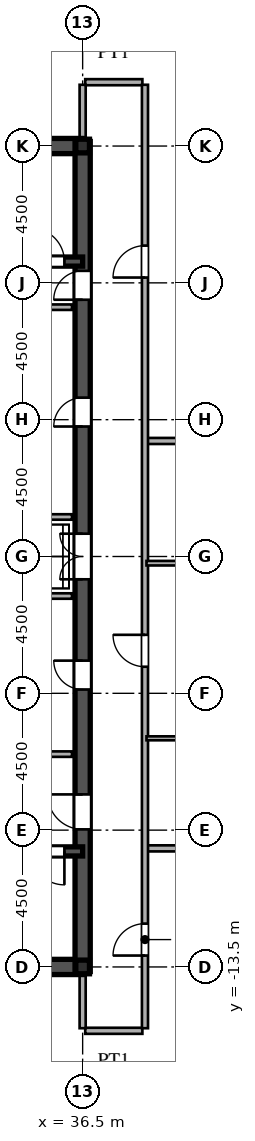
"""IFC4 building model, lengths in metres.
Left out: names, types, materials, properties, quantities, classifications, styles, units other than length and angle.
Written with IfcOpenShell. Run it as: python <this file> out.ifc"""

import sys

from ifc_helpers import new_model, si_unit, direction, frame, frame_2d, origin, origin_2d, place, context, subcontext, project, spatial, rectangle, i_section, extrude, source, transform, mapped, element, fill, save


model = new_model("IFC4")
c1 = context("Model", 3, precision=1e-05, world=origin(), true_north=direction((0.0, 1.0)))
c2 = subcontext(c1, "Body", "Model", "MODEL_VIEW")
j1 = project(units=[si_unit("LENGTHUNIT", "METRE"), si_unit("PLANEANGLEUNIT", "RADIAN")], contexts=[c1])
p1 = place(None, origin())
s1 = spatial("IfcSite", under=j1, at=p1, CompositionType="ELEMENT")
p2 = place(p1, origin())
s2 = spatial("IfcBuilding", under=s1, at=p2, CompositionType="ELEMENT")
p3 = place(p2, frame((0.0, 0.0, 261.9)))
s3 = spatial("IfcBuildingStorey", under=s2, at=p3, CompositionType="ELEMENT", Elevation=261.9)
m1 = source(origin(), c2, "Body", "SweptSolid", [
    extrude(i_section(OverallWidth=0.45, OverallDepth=0.45, WebThickness=0.016, FlangeThickness=0.025, at=origin_2d()), origin(), (0.0, 0.0, 1.0), 3.75),
])
for number, where, z_axis, x_axis in (
    (1, (36.5, -13.5, 0.0), (0.0, 0.0, 1.0), (1.0, 0.0, 0.0)),
    (2, (36.5, 13.5, 0.0), (0.0, 0.0, 1.0), (1.0, 0.0, 0.0)),
):
    element("IfcColumn", number, at=place(p3, frame(where, z_axis=z_axis, x_axis=x_axis)), inside=s3, PredefinedType="COLUMN", context=c2, shape_type="MappedRepresentation", body=[
        mapped(m1, transform((0.0, 0.0, 0.0), scale=1.0)),
    ])
for number, where, z_axis, x_axis in (
    (3, (27.5, -13.5, 0.0), (0.0, 0.0, 1.0), (1.0, 0.0, 0.0)),
    (4, (27.5, 13.5, 0.0), (0.0, 0.0, 1.0), (1.0, 0.0, 0.0)),
):
    element("IfcWall", number, at=place(p3, frame(where, z_axis=z_axis, x_axis=x_axis)), inside=s3, PredefinedType="SHEAR", context=c2, shape_type="SweptSolid", body=[
        extrude(rectangle(XDim=9.0, YDim=0.5, at=frame_2d((4.5, 0.0))), origin(), (0.0, 0.0, 1.0), 3.53),
    ])
p4 = place(p3, frame((36.5, -13.65, 0.0), z_axis=(0.0, 0.0, 1.0), x_axis=(0.0, 1.0, 0.0)))
e5 = element("IfcWall", 5, at=p4, inside=s3, PredefinedType="SHEAR", context=c2, shape_type="SweptSolid", body=[
    extrude(rectangle(XDim=7.15, YDim=0.5, at=frame_2d((3.575, 0.0))), origin(), (0.0, 0.0, 1.0), 3.53),
])
p5 = place(p4, frame((4.675, 0.0, 0.0)))
e6 = element("IfcOpeningElement", 6, at=p5, cuts=e5, PredefinedType="OPENING", context=c2, shape_type="SweptSolid", body=[
    extrude(rectangle(XDim=1.15, YDim=2.2, at=frame_2d((0.575, 1.1))), frame((0.0, 0.26, 0.0), z_axis=(0.0, -1.0, 0.0), x_axis=(1.0, 0.0, 0.0)), (0.0, 0.0, 1.0), 0.52),
])
p6 = place(p3, frame((36.5, -1.3, 0.0), z_axis=(0.0, 0.0, 1.0), x_axis=(0.0, 1.0, 0.0)))
e7 = element("IfcWall", 7, at=p6, inside=s3, PredefinedType="SHEAR", context=c2, shape_type="SweptSolid", body=[
    extrude(rectangle(XDim=2.6, YDim=0.5, at=frame_2d((1.3, 0.0))), origin(), (0.0, 0.0, 1.0), 3.53),
])
p7 = place(p6, frame((0.55, 0.0, 0.0)))
e8 = element("IfcOpeningElement", 8, at=p7, cuts=e7, PredefinedType="OPENING", context=c2, shape_type="SweptSolid", body=[
    extrude(rectangle(XDim=1.5, YDim=2.3, at=frame_2d((0.75, 1.15))), frame((0.0, 0.26, 0.0), z_axis=(0.0, -1.0, 0.0), x_axis=(1.0, 0.0, 0.0)), (0.0, 0.0, 1.0), 0.52),
])
p8 = place(p3, frame((36.5, 8.2, 0.0), z_axis=(0.0, 0.0, 1.0), x_axis=(0.0, 1.0, 0.0)))
e9 = element("IfcWall", 9, at=p8, inside=s3, PredefinedType="SHEAR", context=c2, shape_type="SweptSolid", body=[
    extrude(rectangle(XDim=5.45, YDim=0.5, at=frame_2d((2.725, 0.0))), origin(), (0.0, 0.0, 1.0), 3.53),
])
p9 = place(p8, frame((0.245, 0.0, 0.0)))
e10 = element("IfcOpeningElement", 10, at=p9, cuts=e9, PredefinedType="OPENING", context=c2, shape_type="SweptSolid", body=[
    extrude(rectangle(XDim=0.95, YDim=2.15, at=frame_2d((0.475, 1.075))), frame((0.0, 0.26, 0.0), z_axis=(0.0, -1.0, 0.0), x_axis=(1.0, 0.0, 0.0)), (0.0, 0.0, 1.0), 0.52),
])
p10 = place(p3, frame((36.5, -6.5, 0.0), z_axis=(0.0, 0.0, 1.0), x_axis=(0.0, 1.0, 0.0)))
e11 = element("IfcWall", 11, at=p10, inside=s3, PredefinedType="SHEAR", context=c2, shape_type="SweptSolid", body=[
    extrude(rectangle(XDim=5.2, YDim=0.5, at=frame_2d((2.6, 0.0))), origin(), (0.0, 0.0, 1.0), 3.53),
])
p11 = place(p10, frame((2.125, 0.0, 0.0)))
e12 = element("IfcOpeningElement", 12, at=p11, cuts=e11, PredefinedType="OPENING", context=c2, shape_type="SweptSolid", body=[
    extrude(rectangle(XDim=0.95, YDim=2.15, at=frame_2d((0.475, 1.075))), frame((0.0, 0.26, 0.0), z_axis=(0.0, -1.0, 0.0), x_axis=(1.0, 0.0, 0.0)), (0.0, 0.0, 1.0), 0.52),
])
p12 = place(p3, frame((36.5, 1.3, 0.0), z_axis=(0.0, 0.0, 1.0), x_axis=(0.0, 1.0, 0.0)))
e13 = element("IfcWall", 13, at=p12, inside=s3, PredefinedType="SHEAR", context=c2, shape_type="SweptSolid", body=[
    extrude(rectangle(XDim=6.9, YDim=0.5, at=frame_2d((3.45, 0.0))), origin(), (0.0, 0.0, 1.0), 3.53),
])
p13 = place(p12, frame((2.975, 0.0, 0.0)))
e14 = element("IfcOpeningElement", 14, at=p13, cuts=e13, PredefinedType="OPENING", context=c2, shape_type="SweptSolid", body=[
    extrude(rectangle(XDim=0.95, YDim=2.15, at=frame_2d((0.475, 1.075))), frame((0.0, 0.26, 0.0), z_axis=(0.0, -1.0, 0.0), x_axis=(1.0, 0.0, 0.0)), (0.0, 0.0, 1.0), 0.52),
])
p14 = place(p3, frame((27.5, -9.7, 0.0), z_axis=(0.0, 0.0, 1.0), x_axis=(1.0, 0.0, 0.0)))
e15 = element("IfcWall", 15, at=p14, inside=s3, PredefinedType="SHEAR", context=c2, shape_type="SweptSolid", body=[
    extrude(rectangle(XDim=9.0, YDim=0.3, at=frame_2d((4.5, 0.0))), origin(), (0.0, 0.0, 1.0), 3.53),
])
p15 = place(p14, frame((7.3, 0.0, 0.0)))
e16 = element("IfcOpeningElement", 16, at=p15, cuts=e15, PredefinedType="OPENING", context=c2, shape_type="SweptSolid", body=[
    extrude(rectangle(XDim=1.1, YDim=2.2, at=frame_2d((0.55, 1.1))), frame((0.0, 0.16, 0.0), z_axis=(0.0, -1.0, 0.0), x_axis=(1.0, 0.0, 0.0)), (0.0, 0.0, 1.0), 0.32),
])
p16 = place(p3, frame((27.5, 9.7, 0.0), z_axis=(0.0, 0.0, 1.0), x_axis=(1.0, 0.0, 0.0)))
e17 = element("IfcWall", 17, at=p16, inside=s3, PredefinedType="SHEAR", context=c2, shape_type="SweptSolid", body=[
    extrude(rectangle(XDim=9.0, YDim=0.3, at=frame_2d((4.5, 0.0))), origin(), (0.0, 0.0, 1.0), 3.53),
])
p17 = place(p16, frame((7.3, 0.0, 0.0)))
e18 = element("IfcOpeningElement", 18, at=p17, cuts=e17, PredefinedType="OPENING", context=c2, shape_type="SweptSolid", body=[
    extrude(rectangle(XDim=1.1, YDim=2.2, at=frame_2d((0.55, 1.1))), frame((0.0, 0.16, 0.0), z_axis=(0.0, -1.0, 0.0), x_axis=(1.0, 0.0, 0.0)), (0.0, 0.0, 1.0), 0.32),
])
for number, where, z_axis, x_axis in (
    (19, (30.45, -6.5, 0.0), (0.0, 0.0, 1.0), (1.0, 0.0, 0.0)),
    (20, (30.45, 8.2, 0.0), (0.0, 0.0, 1.0), (1.0, 0.0, 0.0)),
):
    element("IfcWall", number, at=place(p3, frame(where, z_axis=z_axis, x_axis=x_axis)), inside=s3, PredefinedType="PARTITIONING", context=c2, shape_type="SweptSolid", body=[
        extrude(rectangle(XDim=5.7, YDim=0.18, at=frame_2d((2.85, 0.0))), origin(), (0.0, 0.0, 1.0), 3.53),
    ])
for number, where, z_axis, x_axis in (
    (21, (33.2, -1.3, 0.0), (0.0, 0.0, 1.0), (1.0, 0.0, 0.0)),
    (22, (33.2, 1.3, 0.0), (0.0, 0.0, 1.0), (1.0, 0.0, 0.0)),
):
    element("IfcWall", number, at=place(p3, frame(where, z_axis=z_axis, x_axis=x_axis)), inside=s3, PredefinedType="PARTITIONING", context=c2, shape_type="SweptSolid", body=[
        extrude(rectangle(XDim=2.95, YDim=0.18, at=frame_2d((1.475, 0.0))), origin(), (0.0, 0.0, 1.0), 3.53),
    ])
p18 = place(p3, frame((36.585, -15.6, 0.0), z_axis=(0.0, 0.0, 1.0), x_axis=(1.0, 0.0, 0.0)))
e23 = element("IfcWall", 23, at=p18, inside=s3, PredefinedType="PARTITIONING", context=c2, shape_type="SweptSolid", body=[
    extrude(rectangle(XDim=1.88, YDim=0.2, at=frame_2d((0.94, 0.0))), origin(), (0.0, 0.0, 1.0), 3.53),
])
p19 = place(p3, frame((38.63, -9.6, 0.0), z_axis=(0.0, 0.0, 1.0), x_axis=(1.0, 0.0, 0.0)))
e24 = element("IfcWall", 24, at=p19, inside=s3, PredefinedType="PARTITIONING", context=c2, shape_type="SweptSolid", body=[
    extrude(rectangle(XDim=15.38, YDim=0.2, at=frame_2d((7.69, 0.0))), origin(), (0.0, 0.0, 1.0), 3.53),
])
p20 = place(p3, frame((38.6, -5.98, 0.0), z_axis=(0.0, 0.0, 1.0), x_axis=(1.0, 0.0, 0.0)))
e25 = element("IfcWall", 25, at=p20, inside=s3, PredefinedType="PARTITIONING", context=c2, shape_type="SweptSolid", body=[
    extrude(rectangle(XDim=4.8, YDim=0.13, at=frame_2d((2.4, 0.0))), origin(), (0.0, 0.0, 1.0), 3.53),
])
p21 = place(p20, frame((1.96, 0.0, 0.0)))
e26 = element("IfcOpeningElement", 26, at=p21, cuts=e25, PredefinedType="OPENING", context=c2, shape_type="SweptSolid", body=[
    extrude(rectangle(XDim=0.88, YDim=2.1, at=frame_2d((0.44, 1.05))), frame((0.0, 0.075, 0.0), z_axis=(0.0, -1.0, 0.0), x_axis=(1.0, 0.0, 0.0)), (0.0, 0.0, 1.0), 0.15),
])
p22 = place(p3, frame((38.6, -0.22, 0.0), z_axis=(0.0, 0.0, 1.0), x_axis=(1.0, 0.0, 0.0)))
e27 = element("IfcWall", 27, at=p22, inside=s3, PredefinedType="PARTITIONING", context=c2, shape_type="SweptSolid", body=[
    extrude(rectangle(XDim=4.8, YDim=0.15, at=frame_2d((2.4, 0.0))), origin(), (0.0, 0.0, 1.0), 3.53),
])
p23 = place(p22, frame((1.925, 0.0, 0.0)))
e28 = element("IfcOpeningElement", 28, at=p23, cuts=e27, PredefinedType="OPENING", context=c2, shape_type="SweptSolid", body=[
    extrude(rectangle(XDim=0.95, YDim=2.15, at=frame_2d((0.475, 1.075))), frame((0.0, 0.085, 0.0), z_axis=(0.0, -1.0, 0.0), x_axis=(1.0, 0.0, 0.0)), (0.0, 0.0, 1.0), 0.17),
])
p24 = place(p3, frame((38.63, 3.8, 0.0), z_axis=(0.0, 0.0, 1.0), x_axis=(1.0, 0.0, 0.0)))
e29 = element("IfcWall", 29, at=p24, inside=s3, PredefinedType="PARTITIONING", context=c2, shape_type="SweptSolid", body=[
    extrude(rectangle(XDim=25.046, YDim=0.2, at=frame_2d((12.523, 0.0))), origin(), (0.0, 0.0, 1.0), 3.53),
])
p25 = place(p3, frame((36.585, 15.6, 0.0), z_axis=(0.0, 0.0, 1.0), x_axis=(1.0, 0.0, 0.0)))
e30 = element("IfcWall", 30, at=p25, inside=s3, PredefinedType="PARTITIONING", context=c2, shape_type="SweptSolid", body=[
    extrude(rectangle(XDim=1.88, YDim=0.2, at=frame_2d((0.94, 0.0))), origin(), (0.0, 0.0, 1.0), 3.53),
])
for number, where, z_axis, x_axis in (
    (31, (36.5, -15.515, 0.0), (0.0, 0.0, 1.0), (0.0, 1.0, 0.0)),
    (32, (36.5, 13.755, 0.0), (0.0, 0.0, 1.0), (0.0, 1.0, 0.0)),
):
    element("IfcWall", number, at=place(p3, frame(where, z_axis=z_axis, x_axis=x_axis)), inside=s3, PredefinedType="PARTITIONING", context=c2, shape_type="SweptSolid", body=[
        extrude(rectangle(XDim=1.76, YDim=0.2, at=frame_2d((0.88, 0.0))), origin(), (0.0, 0.0, 1.0), 2.93),
    ])
p26 = place(p3, frame((38.55, -15.515, 0.0), z_axis=(0.0, 0.0, 1.0), x_axis=(0.0, 1.0, 0.0)))
e33 = element("IfcWall", 33, at=p26, inside=s3, PredefinedType="PARTITIONING", context=c2, shape_type="SweptSolid", body=[
    extrude(rectangle(XDim=31.03, YDim=0.2, at=frame_2d((15.515, 0.0))), origin(), (0.0, 0.0, 1.0), 3.53),
])
p27 = place(p26, frame((2.39, 0.0, 0.0)))
e34 = element("IfcOpeningElement", 34, at=p27, cuts=e33, PredefinedType="OPENING", context=c2, shape_type="SweptSolid", body=[
    extrude(rectangle(XDim=1.05, YDim=2.25, at=frame_2d((0.525, 1.125))), frame((0.0, 0.11, 0.0), z_axis=(0.0, -1.0, 0.0), x_axis=(1.0, 0.0, 0.0)), (0.0, 0.0, 1.0), 0.22),
])
p28 = place(p26, frame((11.889, 0.0, 0.0)))
e35 = element("IfcOpeningElement", 35, at=p28, cuts=e33, PredefinedType="OPENING", context=c2, shape_type="SweptSolid", body=[
    extrude(rectangle(XDim=1.05, YDim=2.25, at=frame_2d((0.525, 1.125))), frame((0.0, 0.11, 0.0), z_axis=(0.0, -1.0, 0.0), x_axis=(1.0, 0.0, 0.0)), (0.0, 0.0, 1.0), 0.22),
])
p29 = place(p26, frame((24.69, 0.0, 0.0)))
e36 = element("IfcOpeningElement", 36, at=p29, cuts=e33, PredefinedType="OPENING", context=c2, shape_type="SweptSolid", body=[
    extrude(rectangle(XDim=1.05, YDim=2.25, at=frame_2d((0.525, 1.125))), frame((0.0, 0.11, 0.0), z_axis=(0.0, -1.0, 0.0), x_axis=(1.0, 0.0, 0.0)), (0.0, 0.0, 1.0), 0.22),
])
m2 = source(origin(), c2, "Body", "SweptSolid", [
    extrude(rectangle(XDim=1.15, YDim=2.2, at=frame_2d((0.575, 1.1))), frame((0.0, 0.025, 0.0), z_axis=(0.0, -1.0, 0.0), x_axis=(1.0, 0.0, 0.0)), (0.0, 0.0, 1.0), 0.05),
])
p30 = place(p5, origin())
e37 = element("IfcDoor", 37, at=p30, inside=s3, OperationType="SINGLE_SWING_RIGHT", PredefinedType="DOOR", context=c2, shape_type="MappedRepresentation", body=[
    mapped(m2, transform((0.0, 0.0, 0.0), scale=1.0)),
])
fill(e6, e37)
m3 = source(origin(), c2, "Body", "SweptSolid", [
    extrude(rectangle(XDim=1.5, YDim=2.3, at=frame_2d((0.75, 1.15))), frame((0.0, 0.025, 0.0), z_axis=(0.0, -1.0, 0.0), x_axis=(1.0, 0.0, 0.0)), (0.0, 0.0, 1.0), 0.05),
])
p31 = place(p7, origin())
e38 = element("IfcDoor", 38, at=p31, inside=s3, OperationType="DOUBLE_SWING_LEFT", PredefinedType="DOOR", context=c2, shape_type="MappedRepresentation", body=[
    mapped(m3, transform((0.0, 0.0, 0.0), scale=1.0)),
])
fill(e8, e38)
m4 = source(origin(), c2, "Body", "SweptSolid", [
    extrude(rectangle(XDim=0.95, YDim=2.15, at=frame_2d((0.475, 1.075))), frame((0.0, 0.025, 0.0), z_axis=(0.0, -1.0, 0.0), x_axis=(1.0, 0.0, 0.0)), (0.0, 0.0, 1.0), 0.05),
])
p32 = place(p9, origin())
e39 = element("IfcDoor", 39, at=p32, inside=s3, OperationType="SINGLE_SWING_LEFT", PredefinedType="DOOR", context=c2, shape_type="MappedRepresentation", body=[
    mapped(m4, transform((0.0, 0.0, 0.0), scale=1.0)),
])
fill(e10, e39)
p33 = place(p11, origin())
e40 = element("IfcDoor", 40, at=p33, inside=s3, OperationType="SINGLE_SWING_RIGHT", PredefinedType="DOOR", context=c2, shape_type="MappedRepresentation", body=[
    mapped(m4, transform((0.0, 0.0, 0.0), scale=1.0)),
])
fill(e12, e40)
p34 = place(p13, origin())
e41 = element("IfcDoor", 41, at=p34, inside=s3, OperationType="SINGLE_SWING_LEFT", PredefinedType="DOOR", context=c2, shape_type="MappedRepresentation", body=[
    mapped(m4, transform((0.0, 0.0, 0.0), scale=1.0)),
])
fill(e14, e41)
m5 = source(origin(), c2, "Body", "SweptSolid", [
    extrude(rectangle(XDim=1.1, YDim=2.2, at=frame_2d((0.55, 1.1))), frame((0.0, 0.025, 0.0), z_axis=(0.0, -1.0, 0.0), x_axis=(1.0, 0.0, 0.0)), (0.0, 0.0, 1.0), 0.05),
])
p35 = place(p15, frame((1.1, 0.0, 0.0), z_axis=(0.0, 0.0, 1.0), x_axis=(-1.0, 0.0, 0.0)))
e42 = element("IfcDoor", 42, at=p35, inside=s3, OperationType="SINGLE_SWING_RIGHT", PredefinedType="DOOR", context=c2, shape_type="MappedRepresentation", body=[
    mapped(m5, transform((0.0, 0.0, 0.0), scale=1.0)),
])
fill(e16, e42)
p36 = place(p17, origin())
e43 = element("IfcDoor", 43, at=p36, inside=s3, OperationType="SINGLE_SWING_LEFT", PredefinedType="DOOR", context=c2, shape_type="MappedRepresentation", body=[
    mapped(m5, transform((0.0, 0.0, 0.0), scale=1.0)),
])
fill(e18, e43)
m6 = source(origin(), c2, "Body", "SweptSolid", [
    extrude(rectangle(XDim=1.05, YDim=2.25, at=frame_2d((0.525, 1.125))), frame((0.0, 0.025, 0.0), z_axis=(0.0, -1.0, 0.0), x_axis=(1.0, 0.0, 0.0)), (0.0, 0.0, 1.0), 0.05),
])
p37 = place(p27, origin())
e44 = element("IfcDoor", 44, at=p37, inside=s3, OperationType="SINGLE_SWING_LEFT", PredefinedType="DOOR", context=c2, shape_type="MappedRepresentation", body=[
    mapped(m6, transform((0.0, 0.0, 0.0), scale=1.0)),
])
fill(e34, e44)
p38 = place(p28, origin())
e45 = element("IfcDoor", 45, at=p38, inside=s3, OperationType="SINGLE_SWING_RIGHT", PredefinedType="DOOR", context=c2, shape_type="MappedRepresentation", body=[
    mapped(m6, transform((0.0, 0.0, 0.0), scale=1.0)),
])
fill(e35, e45)
p39 = place(p29, origin())
e46 = element("IfcDoor", 46, at=p39, inside=s3, OperationType="SINGLE_SWING_LEFT", PredefinedType="DOOR", context=c2, shape_type="MappedRepresentation", body=[
    mapped(m6, transform((0.0, 0.0, 0.0), scale=1.0)),
])
fill(e36, e46)
save(model, sys.argv[1])
